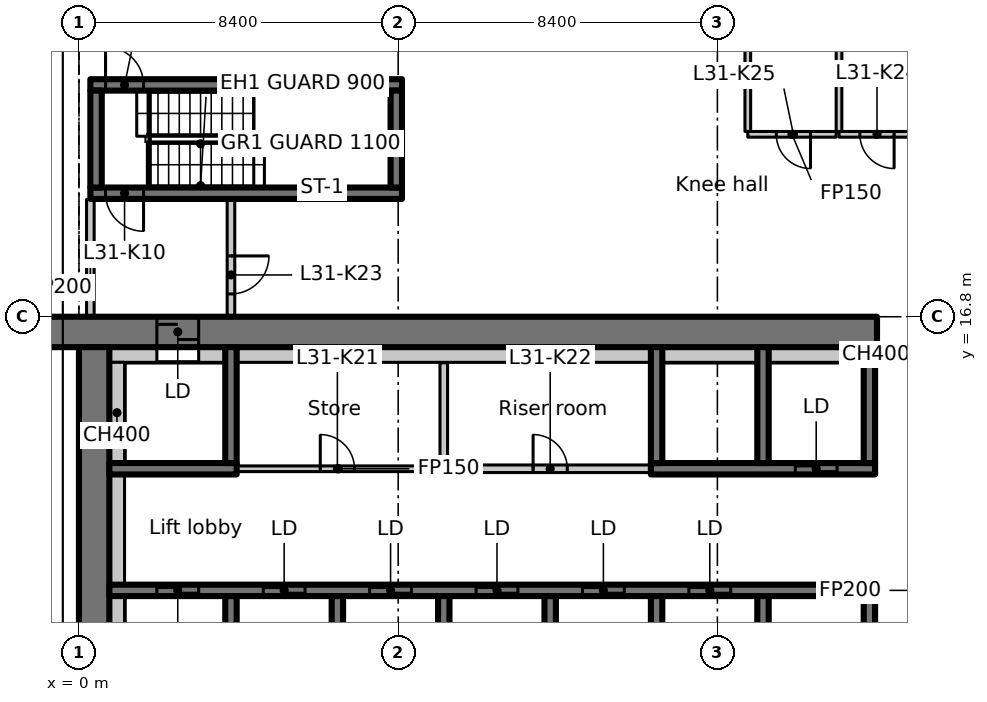
"""IFC4 building model, lengths in metres.
Left out: names, types, materials, properties, quantities, classifications, styles, units other than length and angle.
Written with IfcOpenShell. Run it as: python <this file> out.ifc"""

import sys

from ifc_helpers import new_model, si_unit, direction, frame, frame_2d, origin, place, context, subcontext, project, spatial, rectangle, extrude, element, fill, save


model = new_model("IFC4")
c1 = context("Model", 3, precision=1e-05, world=origin(), true_north=direction((0.0, 1.0)))
c2 = subcontext(c1, "Body", "Model", "MODEL_VIEW")
j1 = project(units=[si_unit("LENGTHUNIT", "METRE"), si_unit("PLANEANGLEUNIT", "RADIAN")], contexts=[c1])
p1 = place(None, origin())
s1 = spatial("IfcSite", under=j1, at=p1, CompositionType="ELEMENT")
p2 = place(p1, origin())
s2 = spatial("IfcBuilding", under=s1, at=p2, CompositionType="ELEMENT")
p3 = place(p2, frame((0.0, 0.0, 127.7)))
s3 = spatial("IfcBuildingStorey", under=s2, at=p3, CompositionType="ELEMENT", Elevation=127.7)
p4 = place(p3, frame((-1.1, 16.4, 0.0), z_axis=(0.0, 0.0, 1.0), x_axis=(1.0, 0.0, 0.0)))
e1 = element("IfcWall", 1, at=p4, inside=s3, PredefinedType="SHEAR", context=c2, shape_type="SweptSolid", body=[
    extrude(rectangle(XDim=22.1, YDim=0.8, at=frame_2d((11.05, 0.0))), origin(), (0.0, 0.0, 1.0), 3.35),
])
p5 = place(p4, frame((3.15, 0.0, 0.0)))
e2 = element("IfcOpeningElement", 2, at=p5, cuts=e1, PredefinedType="OPENING", context=c2, shape_type="SweptSolid", body=[
    extrude(rectangle(XDim=1.1, YDim=2.3, at=frame_2d((0.55, 1.15))), frame((0.0, 0.41, 0.0), z_axis=(0.0, -1.0, 0.0), x_axis=(1.0, 0.0, 0.0)), (0.0, 0.0, 1.0), 0.82),
])
p6 = place(p3, frame((0.4, 7.136, 0.0), z_axis=(0.0, 0.0, 1.0), x_axis=(0.0, 1.0, 0.0)))
e3 = element("IfcWall", 3, at=p6, inside=s3, PredefinedType="SHEAR", context=c2, shape_type="SweptSolid", body=[
    extrude(rectangle(XDim=8.864, YDim=0.8, at=frame_2d((4.432, 0.0))), origin(), (0.0, 0.0, 1.0), 3.35),
])
p7 = place(p3, frame((0.8, 15.8, 0.0), z_axis=(0.0, 0.0, 1.0), x_axis=(1.0, 0.0, 0.0)))
e4 = element("IfcWall", 4, at=p7, inside=s3, PredefinedType="PARTITIONING", context=c2, shape_type="SweptSolid", body=[
    extrude(rectangle(XDim=1.25, YDim=0.4, at=frame_2d((0.625, 0.0))), origin(), (0.0, 0.0, 1.0), 3.35),
])
p8 = place(p3, frame((0.8, 9.6, 0.0), z_axis=(0.0, 0.0, 1.0), x_axis=(1.0, 0.0, 0.0)))
e5 = element("IfcWall", 5, at=p8, inside=s3, PredefinedType="SHEAR", context=c2, shape_type="SweptSolid", body=[
    extrude(rectangle(XDim=20.15, YDim=0.3, at=frame_2d((10.075, 0.0))), origin(), (0.0, 0.0, 1.0), 3.35),
])
p9 = place(p8, frame((1.25, 0.0, 0.0)))
e6 = element("IfcOpeningElement", 6, at=p9, cuts=e5, PredefinedType="OPENING", context=c2, shape_type="SweptSolid", body=[
    extrude(rectangle(XDim=1.1, YDim=2.3, at=frame_2d((0.55, 1.15))), frame((0.0, 0.16, 0.0), z_axis=(0.0, -1.0, 0.0), x_axis=(1.0, 0.0, 0.0)), (0.0, 0.0, 1.0), 0.32),
])
p10 = place(p8, frame((4.05, 0.0, 0.0)))
e7 = element("IfcOpeningElement", 7, at=p10, cuts=e5, PredefinedType="OPENING", context=c2, shape_type="SweptSolid", body=[
    extrude(rectangle(XDim=1.1, YDim=2.3, at=frame_2d((0.55, 1.15))), frame((0.0, 0.16, 0.0), z_axis=(0.0, -1.0, 0.0), x_axis=(1.0, 0.0, 0.0)), (0.0, 0.0, 1.0), 0.32),
])
p11 = place(p8, frame((6.85, 0.0, 0.0)))
e8 = element("IfcOpeningElement", 8, at=p11, cuts=e5, PredefinedType="OPENING", context=c2, shape_type="SweptSolid", body=[
    extrude(rectangle(XDim=1.1, YDim=2.3, at=frame_2d((0.55, 1.15))), frame((0.0, 0.16, 0.0), z_axis=(0.0, -1.0, 0.0), x_axis=(1.0, 0.0, 0.0)), (0.0, 0.0, 1.0), 0.32),
])
p12 = place(p8, frame((9.65, 0.0, 0.0)))
e9 = element("IfcOpeningElement", 9, at=p12, cuts=e5, PredefinedType="OPENING", context=c2, shape_type="SweptSolid", body=[
    extrude(rectangle(XDim=1.1, YDim=2.3, at=frame_2d((0.55, 1.15))), frame((0.0, 0.16, 0.0), z_axis=(0.0, -1.0, 0.0), x_axis=(1.0, 0.0, 0.0)), (0.0, 0.0, 1.0), 0.32),
])
p13 = place(p8, frame((12.45, 0.0, 0.0)))
e10 = element("IfcOpeningElement", 10, at=p13, cuts=e5, PredefinedType="OPENING", context=c2, shape_type="SweptSolid", body=[
    extrude(rectangle(XDim=1.1, YDim=2.3, at=frame_2d((0.55, 1.15))), frame((0.0, 0.16, 0.0), z_axis=(0.0, -1.0, 0.0), x_axis=(1.0, 0.0, 0.0)), (0.0, 0.0, 1.0), 0.32),
])
p14 = place(p8, frame((15.25, 0.0, 0.0)))
e11 = element("IfcOpeningElement", 11, at=p14, cuts=e5, PredefinedType="OPENING", context=c2, shape_type="SweptSolid", body=[
    extrude(rectangle(XDim=1.1, YDim=2.3, at=frame_2d((0.55, 1.15))), frame((0.0, 0.16, 0.0), z_axis=(0.0, -1.0, 0.0), x_axis=(1.0, 0.0, 0.0)), (0.0, 0.0, 1.0), 0.32),
])
for number, where, z_axis, x_axis in (
    (12, (4.0, 7.15, 0.0), (0.0, 0.0, 1.0), (0.0, 1.0, 0.0)),
    (13, (6.8, 7.15, 0.0), (0.0, 0.0, 1.0), (0.0, 1.0, 0.0)),
    (14, (9.6, 7.15, 0.0), (0.0, 0.0, 1.0), (0.0, 1.0, 0.0)),
    (15, (12.4, 7.15, 0.0), (0.0, 0.0, 1.0), (0.0, 1.0, 0.0)),
    (16, (15.2, 7.15, 0.0), (0.0, 0.0, 1.0), (0.0, 1.0, 0.0)),
    (17, (18.0, 7.15, 0.0), (0.0, 0.0, 1.0), (0.0, 1.0, 0.0)),
    (18, (20.8, 7.15, 0.0), (0.0, 0.0, 1.0), (0.0, 1.0, 0.0)),
):
    element("IfcWall", number, at=place(p3, frame(where, z_axis=z_axis, x_axis=x_axis)), inside=s3, PredefinedType="SHEAR", context=c2, shape_type="SweptSolid", body=[
        extrude(rectangle(XDim=2.3, YDim=0.3, at=frame_2d((1.15, 0.0))), origin(), (0.0, 0.0, 1.0), 3.35),
    ])
p15 = place(p3, frame((0.8, 12.8, 0.0), z_axis=(0.0, 0.0, 1.0), x_axis=(1.0, 0.0, 0.0)))
e19 = element("IfcWall", 19, at=p15, inside=s3, PredefinedType="SHEAR", context=c2, shape_type="SweptSolid", body=[
    extrude(rectangle(XDim=3.35, YDim=0.3, at=frame_2d((1.675, 0.0))), origin(), (0.0, 0.0, 1.0), 3.35),
])
p16 = place(p3, frame((4.0, 12.95, 0.0), z_axis=(0.0, 0.0, 1.0), x_axis=(0.0, 1.0, 0.0)))
e20 = element("IfcWall", 20, at=p16, inside=s3, PredefinedType="SHEAR", context=c2, shape_type="SweptSolid", body=[
    extrude(rectangle(XDim=3.05, YDim=0.3, at=frame_2d((1.525, 0.0))), origin(), (0.0, 0.0, 1.0), 3.35),
])
p17 = place(p3, frame((15.05, 12.8, 0.0), z_axis=(0.0, 0.0, 1.0), x_axis=(1.0, 0.0, 0.0)))
e21 = element("IfcWall", 21, at=p17, inside=s3, PredefinedType="SHEAR", context=c2, shape_type="SweptSolid", body=[
    extrude(rectangle(XDim=5.9, YDim=0.3, at=frame_2d((2.95, 0.0))), origin(), (0.0, 0.0, 1.0), 3.35),
])
p18 = place(p17, frame((3.8, 0.0, 0.0)))
e22 = element("IfcOpeningElement", 22, at=p18, cuts=e21, PredefinedType="OPENING", context=c2, shape_type="SweptSolid", body=[
    extrude(rectangle(XDim=1.1, YDim=2.3, at=frame_2d((0.55, 1.15))), frame((0.0, 0.16, 0.0), z_axis=(0.0, -1.0, 0.0), x_axis=(1.0, 0.0, 0.0)), (0.0, 0.0, 1.0), 0.32),
])
for number, where, z_axis, x_axis in (
    (23, (15.2, 12.95, 0.0), (0.0, 0.0, 1.0), (0.0, 1.0, 0.0)),
    (24, (18.0, 12.95, 0.0), (0.0, 0.0, 1.0), (0.0, 1.0, 0.0)),
    (25, (20.8, 12.95, 0.0), (0.0, 0.0, 1.0), (0.0, 1.0, 0.0)),
):
    element("IfcWall", number, at=place(p3, frame(where, z_axis=z_axis, x_axis=x_axis)), inside=s3, PredefinedType="SHEAR", context=c2, shape_type="SweptSolid", body=[
        extrude(rectangle(XDim=3.05, YDim=0.3, at=frame_2d((1.525, 0.0))), origin(), (0.0, 0.0, 1.0), 3.35),
    ])
p19 = place(p3, frame((8.5, 20.05, 0.0), z_axis=(0.0, 0.0, 1.0), x_axis=(-1.0, 0.0, 0.0)))
e26 = element("IfcWall", 26, at=p19, inside=s3, PredefinedType="SHEAR", context=c2, shape_type="SweptSolid", body=[
    extrude(rectangle(XDim=8.2, YDim=0.3, at=frame_2d((4.1, 0.0))), origin(), (0.0, 0.0, 1.0), 3.35),
])
p20 = place(p19, frame((6.8, 0.0, 0.0)))
e27 = element("IfcOpeningElement", 27, at=p20, cuts=e26, PredefinedType="OPENING", context=c2, shape_type="SweptSolid", body=[
    extrude(rectangle(XDim=1.0, YDim=2.1, at=frame_2d((0.5, 1.05))), frame((0.0, 0.16, 0.0), z_axis=(0.0, -1.0, 0.0), x_axis=(1.0, 0.0, 0.0)), (0.0, 0.0, 1.0), 0.32),
])
p21 = place(p3, frame((0.3, 22.9, 0.0), z_axis=(0.0, 0.0, 1.0), x_axis=(1.0, 0.0, 0.0)))
e28 = element("IfcWall", 28, at=p21, inside=s3, PredefinedType="SHEAR", context=c2, shape_type="SweptSolid", body=[
    extrude(rectangle(XDim=8.2, YDim=0.3, at=frame_2d((4.1, 0.0))), origin(), (0.0, 0.0, 1.0), 3.35),
])
p22 = place(p21, frame((0.4, 0.0, 0.0)))
e29 = element("IfcOpeningElement", 29, at=p22, cuts=e28, PredefinedType="OPENING", context=c2, shape_type="SweptSolid", body=[
    extrude(rectangle(XDim=1.0, YDim=2.1, at=frame_2d((0.5, 1.05))), frame((0.0, 0.16, 0.0), z_axis=(0.0, -1.0, 0.0), x_axis=(1.0, 0.0, 0.0)), (0.0, 0.0, 1.0), 0.32),
])
for number, where, z_axis, x_axis in (
    (30, (0.45, 20.2, 0.0), (0.0, 0.0, 1.0), (0.0, 1.0, 0.0)),
    (31, (8.35, 20.2, 0.0), (0.0, 0.0, 1.0), (0.0, 1.0, 0.0)),
):
    element("IfcWall", number, at=place(p3, frame(where, z_axis=z_axis, x_axis=x_axis)), inside=s3, PredefinedType="SHEAR", context=c2, shape_type="SweptSolid", body=[
        extrude(rectangle(XDim=2.55, YDim=0.3, at=frame_2d((1.275, 0.0))), origin(), (0.0, 0.0, 1.0), 3.35),
    ])
p23 = place(p3, frame((0.3, 16.812, 0.0), z_axis=(0.0, 0.0, 1.0), x_axis=(0.0, 1.0, 0.0)))
e32 = element("IfcWall", 32, at=p23, inside=s3, PredefinedType="PARTITIONING", context=c2, shape_type="SweptSolid", body=[
    extrude(rectangle(XDim=3.076, YDim=0.2, at=frame_2d((1.538, 0.0))), origin(), (0.0, 0.0, 1.0), 2.98),
])
p24 = place(p3, frame((4.0, 19.888, 0.0), z_axis=(0.0, 0.0, 1.0), x_axis=(0.0, -1.0, 0.0)))
e33 = element("IfcWall", 33, at=p24, inside=s3, PredefinedType="PARTITIONING", context=c2, shape_type="SweptSolid", body=[
    extrude(rectangle(XDim=3.076, YDim=0.2, at=frame_2d((1.538, 0.0))), origin(), (0.0, 0.0, 1.0), 3.35),
])
p25 = place(p24, frame((1.488, 0.0, 0.0)))
e34 = element("IfcOpeningElement", 34, at=p25, cuts=e33, PredefinedType="OPENING", context=c2, shape_type="SweptSolid", body=[
    extrude(rectangle(XDim=1.0, YDim=2.1, at=frame_2d((0.5, 1.05))), frame((0.0, 0.11, 0.0), z_axis=(0.0, -1.0, 0.0), x_axis=(1.0, 0.0, 0.0)), (0.0, 0.0, 1.0), 0.22),
])
p26 = place(p3, frame((9.6, 15.588, 0.0), z_axis=(0.0, 0.0, 1.0), x_axis=(0.0, -1.0, 0.0)))
e35 = element("IfcWall", 35, at=p26, inside=s3, PredefinedType="PARTITIONING", context=c2, shape_type="SweptSolid", body=[
    extrude(rectangle(XDim=2.788, YDim=0.2, at=frame_2d((1.394, 0.0))), origin(), (0.0, 0.0, 1.0), 3.35),
])
p27 = place(p3, frame((9.7, 12.8, 0.0), z_axis=(0.0, 0.0, 1.0), x_axis=(1.0, 0.0, 0.0)))
e36 = element("IfcWall", 36, at=p27, inside=s3, PredefinedType="PARTITIONING", context=c2, shape_type="SweptSolid", body=[
    extrude(rectangle(XDim=5.338, YDim=0.2, at=frame_2d((2.669, 0.0))), origin(), (0.0, 0.0, 1.0), 3.35),
])
p28 = place(p27, frame((2.25, 0.0, 0.0)))
e37 = element("IfcOpeningElement", 37, at=p28, cuts=e36, PredefinedType="OPENING", context=c2, shape_type="SweptSolid", body=[
    extrude(rectangle(XDim=0.9, YDim=2.1, at=frame_2d((0.45, 1.05))), frame((0.0, 0.11, 0.0), z_axis=(0.0, -1.0, 0.0), x_axis=(1.0, 0.0, 0.0)), (0.0, 0.0, 1.0), 0.22),
])
p29 = place(p3, frame((4.162, 12.8, 0.0), z_axis=(0.0, 0.0, 1.0), x_axis=(1.0, 0.0, 0.0)))
e38 = element("IfcWall", 38, at=p29, inside=s3, PredefinedType="PARTITIONING", context=c2, shape_type="SweptSolid", body=[
    extrude(rectangle(XDim=5.338, YDim=0.15, at=frame_2d((2.669, 0.0))), origin(), (0.0, 0.0, 1.0), 3.35),
])
p30 = place(p29, frame((2.188, 0.0, 0.0)))
e39 = element("IfcOpeningElement", 39, at=p30, cuts=e38, PredefinedType="OPENING", context=c2, shape_type="SweptSolid", body=[
    extrude(rectangle(XDim=0.9, YDim=2.1, at=frame_2d((0.45, 1.05))), frame((0.0, 0.085, 0.0), z_axis=(0.0, -1.0, 0.0), x_axis=(1.0, 0.0, 0.0)), (0.0, 0.0, 1.0), 0.17),
])
p31 = place(p3, frame((21.925, 21.6, 0.0), z_axis=(0.0, 0.0, 1.0), x_axis=(-1.0, 0.0, 0.0)))
e40 = element("IfcWall", 40, at=p31, inside=s3, PredefinedType="PARTITIONING", context=c2, shape_type="SweptSolid", body=[
    extrude(rectangle(XDim=1.925, YDim=0.15, at=frame_2d((0.962, 0.0))), origin(), (0.0, 0.0, 1.0), 3.35),
])
p32 = place(p31, frame((0.475, 0.0, 0.0)))
e41 = element("IfcOpeningElement", 41, at=p32, cuts=e40, PredefinedType="OPENING", context=c2, shape_type="SweptSolid", body=[
    extrude(rectangle(XDim=0.9, YDim=2.1, at=frame_2d((0.45, 1.05))), frame((0.0, 0.085, 0.0), z_axis=(0.0, -1.0, 0.0), x_axis=(1.0, 0.0, 0.0)), (0.0, 0.0, 1.0), 0.17),
])
p33 = place(p3, frame((20.0, 21.675, 0.0), z_axis=(0.0, 0.0, 1.0), x_axis=(0.0, 1.0, 0.0)))
e42 = element("IfcWall", 42, at=p33, inside=s3, PredefinedType="PARTITIONING", context=c2, shape_type="SweptSolid", body=[
    extrude(rectangle(XDim=2.25, YDim=0.15, at=frame_2d((1.125, 0.0))), origin(), (0.0, 0.0, 1.0), 3.35),
])
p34 = place(p3, frame((19.925, 21.6, 0.0), z_axis=(0.0, 0.0, 1.0), x_axis=(-1.0, 0.0, 0.0)))
e43 = element("IfcWall", 43, at=p34, inside=s3, PredefinedType="PARTITIONING", context=c2, shape_type="SweptSolid", body=[
    extrude(rectangle(XDim=2.325, YDim=0.15, at=frame_2d((1.163, 0.0))), origin(), (0.0, 0.0, 1.0), 3.35),
])
p35 = place(p34, frame((0.675, 0.0, 0.0)))
e44 = element("IfcOpeningElement", 44, at=p35, cuts=e43, PredefinedType="OPENING", context=c2, shape_type="SweptSolid", body=[
    extrude(rectangle(XDim=0.9, YDim=2.1, at=frame_2d((0.45, 1.05))), frame((0.0, 0.085, 0.0), z_axis=(0.0, -1.0, 0.0), x_axis=(1.0, 0.0, 0.0)), (0.0, 0.0, 1.0), 0.17),
])
p36 = place(p3, frame((17.6, 21.675, 0.0), z_axis=(0.0, 0.0, 1.0), x_axis=(0.0, 1.0, 0.0)))
e45 = element("IfcWall", 45, at=p36, inside=s3, PredefinedType="PARTITIONING", context=c2, shape_type="SweptSolid", body=[
    extrude(rectangle(XDim=2.325, YDim=0.15, at=frame_2d((1.163, 0.0))), origin(), (0.0, 0.0, 1.0), 3.35),
])
p37 = place(p3, frame((1.0, 7.15, 0.0), z_axis=(0.0, 0.0, 1.0), x_axis=(0.0, 1.0, 0.0)))
e46 = element("IfcWall", 46, at=p37, inside=s3, PredefinedType="PARTITIONING", context=c2, shape_type="SweptSolid", body=[
    extrude(rectangle(XDim=2.3, YDim=0.4, at=frame_2d((1.15, 0.0))), origin(), (0.0, 0.0, 1.0), 3.35),
])
p38 = place(p3, frame((1.0, 9.75, 0.0), z_axis=(0.0, 0.0, 1.0), x_axis=(0.0, 1.0, 0.0)))
e47 = element("IfcWall", 47, at=p38, inside=s3, PredefinedType="PARTITIONING", context=c2, shape_type="SweptSolid", body=[
    extrude(rectangle(XDim=2.9, YDim=0.4, at=frame_2d((1.45, 0.0))), origin(), (0.0, 0.0, 1.0), 3.35),
])
p39 = place(p3, frame((1.0, 12.95, 0.0), z_axis=(0.0, 0.0, 1.0), x_axis=(0.0, 1.0, 0.0)))
e48 = element("IfcWall", 48, at=p39, inside=s3, PredefinedType="PARTITIONING", context=c2, shape_type="SweptSolid", body=[
    extrude(rectangle(XDim=2.65, YDim=0.4, at=frame_2d((1.325, 0.0))), origin(), (0.0, 0.0, 1.0), 3.35),
])
p40 = place(p3, frame((3.15, 15.8, 0.0), z_axis=(0.0, 0.0, 1.0), x_axis=(1.0, 0.0, 0.0)))
e49 = element("IfcWall", 49, at=p40, inside=s3, PredefinedType="PARTITIONING", context=c2, shape_type="SweptSolid", body=[
    extrude(rectangle(XDim=0.7, YDim=0.4, at=frame_2d((0.35, 0.0))), origin(), (0.0, 0.0, 1.0), 3.35),
])
p41 = place(p3, frame((4.15, 15.8, 0.0), z_axis=(0.0, 0.0, 1.0), x_axis=(1.0, 0.0, 0.0)))
e50 = element("IfcWall", 50, at=p41, inside=s3, PredefinedType="PARTITIONING", context=c2, shape_type="SweptSolid", body=[
    extrude(rectangle(XDim=10.9, YDim=0.4, at=frame_2d((5.45, 0.0))), origin(), (0.0, 0.0, 1.0), 3.35),
])
for number, where, z_axis, x_axis in (
    (51, (15.35, 15.8, 0.0), (0.0, 0.0, 1.0), (1.0, 0.0, 0.0)),
    (52, (18.15, 15.8, 0.0), (0.0, 0.0, 1.0), (1.0, 0.0, 0.0)),
):
    element("IfcWall", number, at=place(p3, frame(where, z_axis=z_axis, x_axis=x_axis)), inside=s3, PredefinedType="PARTITIONING", context=c2, shape_type="SweptSolid", body=[
        extrude(rectangle(XDim=2.5, YDim=0.4, at=frame_2d((1.25, 0.0))), origin(), (0.0, 0.0, 1.0), 3.35),
    ])
p42 = place(p3, frame((20.95, 15.8, 0.0), z_axis=(0.0, 0.0, 1.0), x_axis=(1.0, 0.0, 0.0)))
e53 = element("IfcWall", 53, at=p42, inside=s3, PredefinedType="PARTITIONING", context=c2, shape_type="SweptSolid", body=[
    extrude(rectangle(XDim=0.05, YDim=0.4, at=frame_2d((0.025, 0.0))), origin(), (0.0, 0.0, 1.0), 3.35),
])
p43 = place(p9, origin())
e54 = element("IfcDoor", 54, at=p43, inside=s3, OperationType="SLIDING_TO_LEFT", PredefinedType="DOOR", context=c2, shape_type="SweptSolid", body=[
    extrude(rectangle(XDim=1.1, YDim=2.3, at=frame_2d((0.55, 1.15))), frame((0.0, 0.025, 0.0), z_axis=(0.0, -1.0, 0.0), x_axis=(1.0, 0.0, 0.0)), (0.0, 0.0, 1.0), 0.05),
])
fill(e6, e54)
p44 = place(p10, origin())
e55 = element("IfcDoor", 55, at=p44, inside=s3, OperationType="SLIDING_TO_LEFT", PredefinedType="DOOR", context=c2, shape_type="SweptSolid", body=[
    extrude(rectangle(XDim=1.1, YDim=2.3, at=frame_2d((0.55, 1.15))), frame((0.0, 0.025, 0.0), z_axis=(0.0, -1.0, 0.0), x_axis=(1.0, 0.0, 0.0)), (0.0, 0.0, 1.0), 0.05),
])
fill(e7, e55)
p45 = place(p11, origin())
e56 = element("IfcDoor", 56, at=p45, inside=s3, OperationType="SLIDING_TO_LEFT", PredefinedType="DOOR", context=c2, shape_type="SweptSolid", body=[
    extrude(rectangle(XDim=1.1, YDim=2.3, at=frame_2d((0.55, 1.15))), frame((0.0, 0.025, 0.0), z_axis=(0.0, -1.0, 0.0), x_axis=(1.0, 0.0, 0.0)), (0.0, 0.0, 1.0), 0.05),
])
fill(e8, e56)
p46 = place(p12, origin())
e57 = element("IfcDoor", 57, at=p46, inside=s3, OperationType="SLIDING_TO_LEFT", PredefinedType="DOOR", context=c2, shape_type="SweptSolid", body=[
    extrude(rectangle(XDim=1.1, YDim=2.3, at=frame_2d((0.55, 1.15))), frame((0.0, 0.025, 0.0), z_axis=(0.0, -1.0, 0.0), x_axis=(1.0, 0.0, 0.0)), (0.0, 0.0, 1.0), 0.05),
])
fill(e9, e57)
p47 = place(p13, origin())
e58 = element("IfcDoor", 58, at=p47, inside=s3, OperationType="SLIDING_TO_LEFT", PredefinedType="DOOR", context=c2, shape_type="SweptSolid", body=[
    extrude(rectangle(XDim=1.1, YDim=2.3, at=frame_2d((0.55, 1.15))), frame((0.0, 0.025, 0.0), z_axis=(0.0, -1.0, 0.0), x_axis=(1.0, 0.0, 0.0)), (0.0, 0.0, 1.0), 0.05),
])
fill(e10, e58)
p48 = place(p14, origin())
e59 = element("IfcDoor", 59, at=p48, inside=s3, OperationType="SLIDING_TO_LEFT", PredefinedType="DOOR", context=c2, shape_type="SweptSolid", body=[
    extrude(rectangle(XDim=1.1, YDim=2.3, at=frame_2d((0.55, 1.15))), frame((0.0, 0.025, 0.0), z_axis=(0.0, -1.0, 0.0), x_axis=(1.0, 0.0, 0.0)), (0.0, 0.0, 1.0), 0.05),
])
fill(e11, e59)
p49 = place(p5, origin())
e60 = element("IfcDoor", 60, at=p49, inside=s3, OperationType="SLIDING_TO_LEFT", PredefinedType="DOOR", context=c2, shape_type="SweptSolid", body=[
    extrude(rectangle(XDim=1.1, YDim=2.3, at=frame_2d((0.55, 1.15))), frame((0.0, 0.025, 0.0), z_axis=(0.0, -1.0, 0.0), x_axis=(1.0, 0.0, 0.0)), (0.0, 0.0, 1.0), 0.05),
])
fill(e2, e60)
p50 = place(p18, origin())
e61 = element("IfcDoor", 61, at=p50, inside=s3, OperationType="SLIDING_TO_LEFT", PredefinedType="DOOR", context=c2, shape_type="SweptSolid", body=[
    extrude(rectangle(XDim=1.1, YDim=2.3, at=frame_2d((0.55, 1.15))), frame((0.0, 0.025, 0.0), z_axis=(0.0, -1.0, 0.0), x_axis=(1.0, 0.0, 0.0)), (0.0, 0.0, 1.0), 0.05),
])
fill(e22, e61)
p51 = place(p20, origin())
e62 = element("IfcDoor", 62, at=p51, inside=s3, OperationType="SINGLE_SWING_LEFT", PredefinedType="DOOR", context=c2, shape_type="SweptSolid", body=[
    extrude(rectangle(XDim=1.0, YDim=2.1, at=frame_2d((0.5, 1.05))), frame((0.0, 0.025, 0.0), z_axis=(0.0, -1.0, 0.0), x_axis=(1.0, 0.0, 0.0)), (0.0, 0.0, 1.0), 0.05),
])
fill(e27, e62)
p52 = place(p22, origin())
e63 = element("IfcDoor", 63, at=p52, inside=s3, OperationType="SINGLE_SWING_RIGHT", PredefinedType="DOOR", context=c2, shape_type="SweptSolid", body=[
    extrude(rectangle(XDim=1.0, YDim=2.1, at=frame_2d((0.5, 1.05))), frame((0.0, 0.025, 0.0), z_axis=(0.0, -1.0, 0.0), x_axis=(1.0, 0.0, 0.0)), (0.0, 0.0, 1.0), 0.05),
])
fill(e29, e63)
p53 = place(p30, origin())
e64 = element("IfcDoor", 64, at=p53, inside=s3, OperationType="SINGLE_SWING_RIGHT", PredefinedType="DOOR", context=c2, shape_type="SweptSolid", body=[
    extrude(rectangle(XDim=0.9, YDim=2.1, at=frame_2d((0.45, 1.05))), frame((0.0, 0.025, 0.0), z_axis=(0.0, -1.0, 0.0), x_axis=(1.0, 0.0, 0.0)), (0.0, 0.0, 1.0), 0.05),
])
fill(e39, e64)
p54 = place(p28, origin())
e65 = element("IfcDoor", 65, at=p54, inside=s3, OperationType="SINGLE_SWING_LEFT", PredefinedType="DOOR", context=c2, shape_type="SweptSolid", body=[
    extrude(rectangle(XDim=0.9, YDim=2.1, at=frame_2d((0.45, 1.05))), frame((0.0, 0.025, 0.0), z_axis=(0.0, -1.0, 0.0), x_axis=(1.0, 0.0, 0.0)), (0.0, 0.0, 1.0), 0.05),
])
fill(e37, e65)
p55 = place(p25, origin())
e66 = element("IfcDoor", 66, at=p55, inside=s3, OperationType="SINGLE_SWING_RIGHT", PredefinedType="DOOR", context=c2, shape_type="SweptSolid", body=[
    extrude(rectangle(XDim=1.0, YDim=2.1, at=frame_2d((0.5, 1.05))), frame((0.0, 0.025, 0.0), z_axis=(0.0, -1.0, 0.0), x_axis=(1.0, 0.0, 0.0)), (0.0, 0.0, 1.0), 0.05),
])
fill(e34, e66)
p56 = place(p32, origin())
e67 = element("IfcDoor", 67, at=p56, inside=s3, OperationType="SINGLE_SWING_LEFT", PredefinedType="DOOR", context=c2, shape_type="SweptSolid", body=[
    extrude(rectangle(XDim=0.9, YDim=2.1, at=frame_2d((0.45, 1.05))), frame((0.0, 0.025, 0.0), z_axis=(0.0, -1.0, 0.0), x_axis=(1.0, 0.0, 0.0)), (0.0, 0.0, 1.0), 0.05),
])
fill(e41, e67)
p57 = place(p35, origin())
e68 = element("IfcDoor", 68, at=p57, inside=s3, OperationType="SINGLE_SWING_RIGHT", PredefinedType="DOOR", context=c2, shape_type="SweptSolid", body=[
    extrude(rectangle(XDim=0.9, YDim=2.1, at=frame_2d((0.45, 1.05))), frame((0.0, 0.025, 0.0), z_axis=(0.0, -1.0, 0.0), x_axis=(1.0, 0.0, 0.0)), (0.0, 0.0, 1.0), 0.05),
])
fill(e44, e68)
save(model, sys.argv[1])
